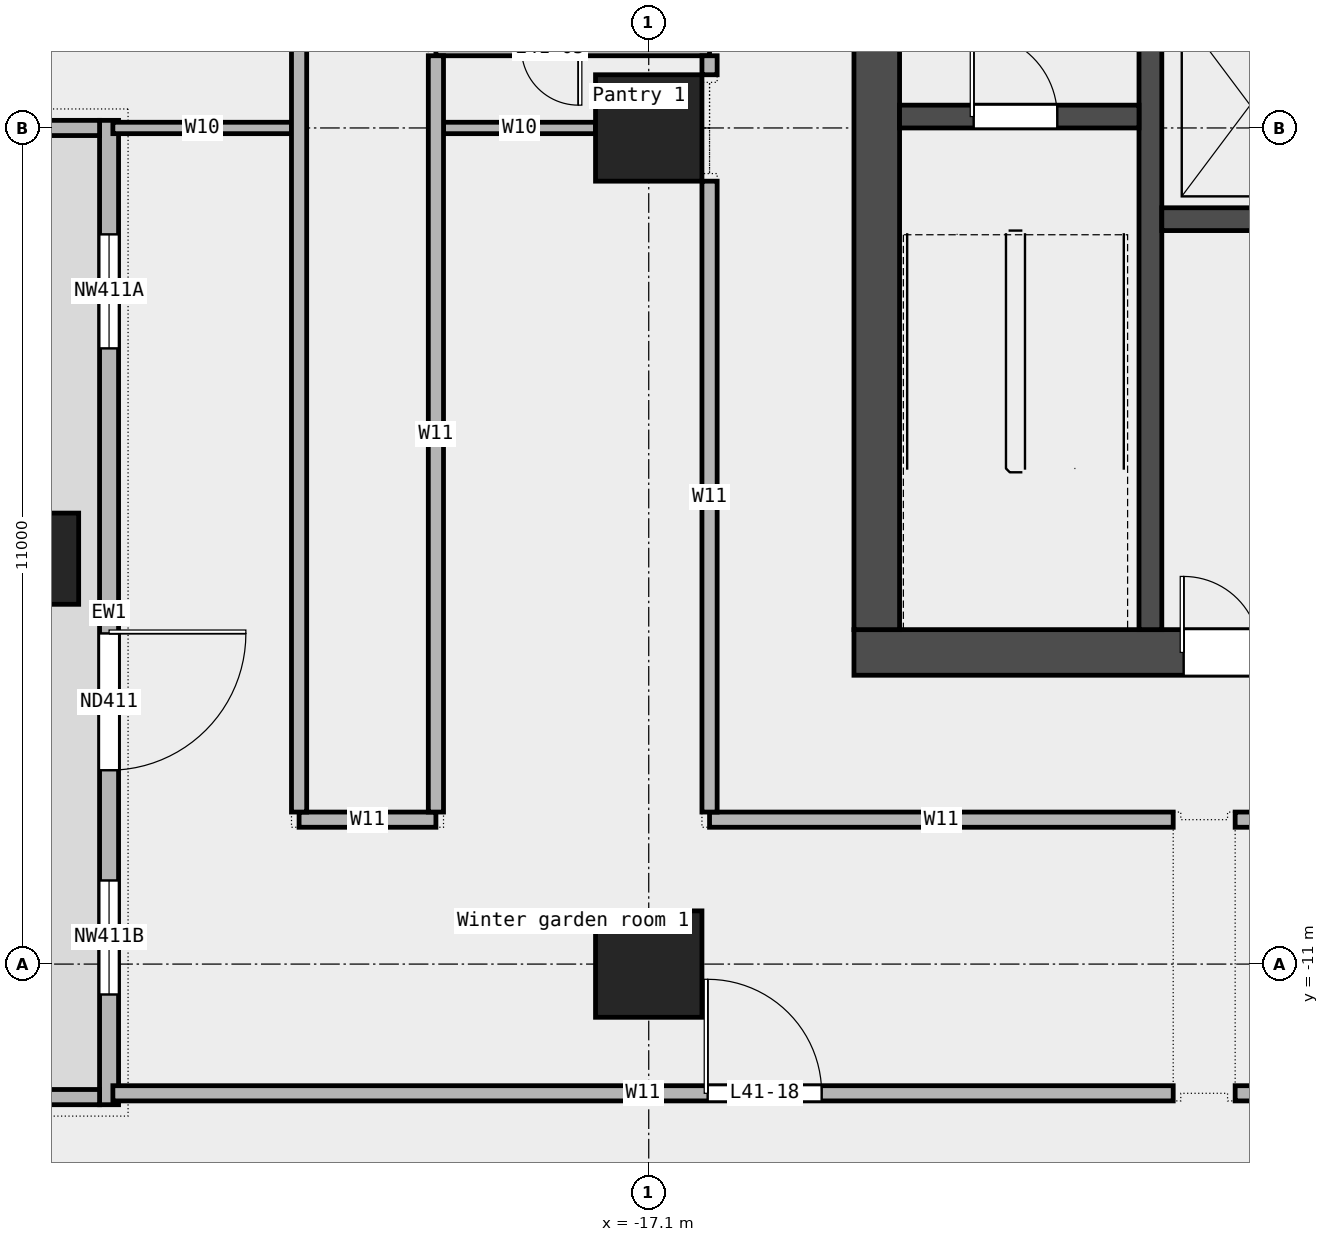
"""IFC4 building model, lengths in metres.
Left out: names, types, materials, properties, quantities, classifications, styles, units other than length and angle.
Written with IfcOpenShell. Run it as: python <this file> out.ifc"""

import sys

from ifc_helpers import new_model, si_unit, direction, frame, frame_2d, origin, origin_2d, place, context, subcontext, project, spatial, rectangle, extrude, element, fill, save


model = new_model("IFC4")
c1 = context("Model", 3, precision=1e-05, world=origin(), true_north=direction((0.0, 1.0)))
c2 = subcontext(c1, "Body", "Model", "MODEL_VIEW")
j1 = project(units=[si_unit("LENGTHUNIT", "METRE"), si_unit("PLANEANGLEUNIT", "RADIAN")], contexts=[c1])
p1 = place(None, origin())
s1 = spatial("IfcSite", under=j1, at=p1, CompositionType="ELEMENT")
p2 = place(p1, origin())
s2 = spatial("IfcBuilding", under=s1, at=p2, CompositionType="ELEMENT")
p3 = place(p2, frame((0.0, 0.0, 197.0)))
s3 = spatial("IfcBuildingStorey", under=s2, at=p3, CompositionType="ELEMENT", Elevation=197.0)
p4 = place(p3, frame((-25.2, -5.667, 0.0), z_axis=(0.0, 0.0, 1.0), x_axis=(1.0, 0.0, 0.0)))
e1 = element("IfcColumn", 1, at=p4, inside=s3, PredefinedType="COLUMN", context=c2, shape_type="SweptSolid", body=[
    extrude(rectangle(XDim=1.2, YDim=1.2, at=origin_2d()), origin(), (0.0, 0.0, 1.0), 3.6),
])
for number, where, z_axis, x_axis in (
    (2, (-17.1, -11.0, 0.0), (0.0, 0.0, 1.0), (1.0, 0.0, 0.0)),
    (3, (-17.1, 0.0, 0.0), (0.0, 0.0, 1.0), (1.0, 0.0, 0.0)),
):
    element("IfcColumn", number, at=place(p3, frame(where, z_axis=z_axis, x_axis=x_axis)), inside=s3, PredefinedType="COLUMN", context=c2, shape_type="SweptSolid", body=[
        extrude(rectangle(XDim=1.4, YDim=1.4, at=origin_2d()), origin(), (0.0, 0.0, 1.0), 3.6),
    ])
p5 = place(p3, frame((-24.2, 0.1, 0.0), z_axis=(0.0, 0.0, 1.0), x_axis=(0.0, -1.0, 0.0)))
e4 = element("IfcWall", 4, at=p5, inside=s3, PredefinedType="STANDARD", context=c2, shape_type="SweptSolid", body=[
    extrude(rectangle(XDim=12.95, YDim=0.25, at=frame_2d((6.475, 0.0))), origin(), (0.0, 0.0, 1.0), 3.6),
])
p6 = place(p5, frame((1.5, 0.0, 0.45)))
e5 = element("IfcOpeningElement", 5, at=p6, cuts=e4, PredefinedType="OPENING", context=c2, shape_type="SweptSolid", body=[
    extrude(rectangle(XDim=1.5, YDim=2.4, at=frame_2d((0.75, 1.2))), frame((0.0, 0.137, 0.0), z_axis=(0.0, -1.0, 0.0), x_axis=(1.0, 0.0, 0.0)), (0.0, 0.0, 1.0), 0.274),
])
p7 = place(p5, frame((6.75, 0.0, 0.0)))
e6 = element("IfcOpeningElement", 6, at=p7, cuts=e4, PredefinedType="OPENING", context=c2, shape_type="SweptSolid", body=[
    extrude(rectangle(XDim=1.8, YDim=2.4, at=frame_2d((0.9, 1.2))), frame((0.0, 0.137, 0.0), z_axis=(0.0, -1.0, 0.0), x_axis=(1.0, 0.0, 0.0)), (0.0, 0.0, 1.0), 0.274),
])
p8 = place(p5, frame((10.0, 0.0, 0.45)))
e7 = element("IfcOpeningElement", 7, at=p8, cuts=e4, PredefinedType="OPENING", context=c2, shape_type="SweptSolid", body=[
    extrude(rectangle(XDim=1.5, YDim=2.4, at=frame_2d((0.75, 1.2))), frame((0.0, 0.137, 0.0), z_axis=(0.0, -1.0, 0.0), x_axis=(1.0, 0.0, 0.0)), (0.0, 0.0, 1.0), 0.274),
])
for number, where, z_axis, x_axis in (
    (8, (-26.2, 0.0, 0.0), (0.0, 0.0, 1.0), (1.0, 0.0, 0.0)),
    (9, (-26.2, -12.75, 0.0), (0.0, 0.0, 1.0), (1.0, 0.0, 0.0)),
):
    element("IfcWall", number, at=place(p3, frame(where, z_axis=z_axis, x_axis=x_axis)), inside=s3, PredefinedType="STANDARD", context=c2, shape_type="SweptSolid", body=[
        extrude(rectangle(XDim=1.875, YDim=0.2, at=frame_2d((0.938, 0.0))), origin(), (0.0, 0.0, 1.0), 3.6),
    ])
p9 = place(p3, frame((-24.15, -12.7, 0.0), z_axis=(0.0, 0.0, 1.0), x_axis=(1.0, 0.0, 0.0)))
e10 = element("IfcWall", 10, at=p9, inside=s3, PredefinedType="PARTITIONING", context=c2, shape_type="SweptSolid", body=[
    extrude(rectangle(XDim=13.95, YDim=0.2, at=frame_2d((6.975, 0.0))), origin(), (0.0, 0.0, 1.0), 3.6),
])
p10 = place(p9, frame((7.825, 0.0, 0.0)))
e11 = element("IfcOpeningElement", 11, at=p10, cuts=e10, PredefinedType="OPENING", context=c2, shape_type="SweptSolid", body=[
    extrude(rectangle(XDim=1.5, YDim=2.1, at=frame_2d((0.75, 1.05))), frame((0.0, 0.112, 0.0), z_axis=(0.0, -1.0, 0.0), x_axis=(1.0, 0.0, 0.0)), (0.0, 0.0, 1.0), 0.224),
])
p11 = place(p3, frame((-9.385, -12.7, 0.0), z_axis=(0.0, 0.0, 1.0), x_axis=(1.0, 0.0, 0.0)))
e12 = element("IfcWall", 12, at=p11, inside=s3, PredefinedType="PARTITIONING", context=c2, shape_type="SweptSolid", body=[
    extrude(rectangle(XDim=12.425, YDim=0.2, at=frame_2d((6.212, 0.0))), origin(), (0.0, 0.0, 1.0), 3.6),
])
p12 = place(p3, frame((-21.7, -9.1, 0.0), z_axis=(0.0, 0.0, 1.0), x_axis=(1.0, 0.0, 0.0)))
e13 = element("IfcWall", 13, at=p12, inside=s3, PredefinedType="PARTITIONING", context=c2, shape_type="SweptSolid", body=[
    extrude(rectangle(XDim=1.8, YDim=0.2, at=frame_2d((0.9, 0.0))), origin(), (0.0, 0.0, 1.0), 3.6),
])
p13 = place(p3, frame((-16.3, -9.1, 0.0), z_axis=(0.0, 0.0, 1.0), x_axis=(1.0, 0.0, 0.0)))
e14 = element("IfcWall", 14, at=p13, inside=s3, PredefinedType="PARTITIONING", context=c2, shape_type="SweptSolid", body=[
    extrude(rectangle(XDim=6.1, YDim=0.2, at=frame_2d((3.05, 0.0))), origin(), (0.0, 0.0, 1.0), 3.6),
])
p14 = place(p3, frame((-9.385, -9.1, 0.0), z_axis=(0.0, 0.0, 1.0), x_axis=(1.0, 0.0, 0.0)))
e15 = element("IfcWall", 15, at=p14, inside=s3, PredefinedType="PARTITIONING", context=c2, shape_type="SweptSolid", body=[
    extrude(rectangle(XDim=12.425, YDim=0.2, at=frame_2d((6.212, 0.0))), origin(), (0.0, 0.0, 1.0), 3.6),
])
p15 = place(p14, frame((5.762, 0.0, 0.0)))
e16 = element("IfcOpeningElement", 16, at=p15, cuts=e15, PredefinedType="OPENING", context=c2, shape_type="SweptSolid", body=[
    extrude(rectangle(XDim=0.9, YDim=2.1, at=frame_2d((0.45, 1.05))), frame((0.0, 0.112, 0.0), z_axis=(0.0, -1.0, 0.0), x_axis=(1.0, 0.0, 0.0)), (0.0, 0.0, 1.0), 0.224),
])
p16 = place(p3, frame((-24.15, 0.0, 0.0), z_axis=(0.0, 0.0, 1.0), x_axis=(1.0, 0.0, 0.0)))
e17 = element("IfcWall", 17, at=p16, inside=s3, PredefinedType="PARTITIONING", context=c2, shape_type="SweptSolid", body=[
    extrude(rectangle(XDim=2.35, YDim=0.15, at=frame_2d((1.175, 0.0))), origin(), (0.0, 0.0, 1.0), 3.6),
])
p17 = place(p3, frame((-19.8, 0.0, 0.0), z_axis=(0.0, 0.0, 1.0), x_axis=(1.0, 0.0, 0.0)))
e18 = element("IfcWall", 18, at=p17, inside=s3, PredefinedType="PARTITIONING", context=c2, shape_type="SweptSolid", body=[
    extrude(rectangle(XDim=2.0, YDim=0.15, at=frame_2d((1.0, 0.0))), origin(), (0.0, 0.0, 1.0), 3.6),
])
p18 = place(p3, frame((-19.9, 1.05, 0.0), z_axis=(0.0, 0.0, 1.0), x_axis=(1.0, 0.0, 0.0)))
e19 = element("IfcWall", 19, at=p18, inside=s3, PredefinedType="PARTITIONING", context=c2, shape_type="SweptSolid", body=[
    extrude(rectangle(XDim=3.6, YDim=0.2, at=frame_2d((1.8, 0.0))), origin(), (0.0, 0.0, 1.0), 3.6),
])
p19 = place(p18, frame((1.125, 0.0, 0.0)))
e20 = element("IfcOpeningElement", 20, at=p19, cuts=e19, PredefinedType="OPENING", context=c2, shape_type="SweptSolid", body=[
    extrude(rectangle(XDim=0.75, YDim=2.1, at=frame_2d((0.375, 1.05))), frame((0.0, 0.112, 0.0), z_axis=(0.0, -1.0, 0.0), x_axis=(1.0, 0.0, 0.0)), (0.0, 0.0, 1.0), 0.224),
])
p20 = place(p3, frame((-21.7, -9.0, 0.0), z_axis=(0.0, 0.0, 1.0), x_axis=(0.0, 1.0, 0.0)))
e21 = element("IfcWall", 21, at=p20, inside=s3, PredefinedType="PARTITIONING", context=c2, shape_type="SweptSolid", body=[
    extrude(rectangle(XDim=24.3, YDim=0.2, at=frame_2d((12.15, 0.0))), origin(), (0.0, 0.0, 1.0), 3.6),
])
p21 = place(p20, frame((18.305, 0.0, 0.0)))
e22 = element("IfcOpeningElement", 22, at=p21, cuts=e21, PredefinedType="OPENING", context=c2, shape_type="SweptSolid", body=[
    extrude(rectangle(XDim=1.2, YDim=2.1, at=frame_2d((0.6, 1.05))), frame((0.0, 0.112, 0.0), z_axis=(0.0, -1.0, 0.0), x_axis=(1.0, 0.0, 0.0)), (0.0, 0.0, 1.0), 0.224),
])
p22 = place(p20, frame((10.805, 0.0, 0.0)))
e23 = element("IfcOpeningElement", 23, at=p22, cuts=e21, PredefinedType="OPENING", context=c2, shape_type="SweptSolid", body=[
    extrude(rectangle(XDim=0.9, YDim=2.1, at=frame_2d((0.45, 1.05))), frame((0.0, 0.112, 0.0), z_axis=(0.0, -1.0, 0.0), x_axis=(1.0, 0.0, 0.0)), (0.0, 0.0, 1.0), 0.224),
])
p23 = place(p3, frame((-19.9, -9.0, 0.0), z_axis=(0.0, 0.0, 1.0), x_axis=(0.0, 1.0, 0.0)))
e24 = element("IfcWall", 24, at=p23, inside=s3, PredefinedType="PARTITIONING", context=c2, shape_type="SweptSolid", body=[
    extrude(rectangle(XDim=9.95, YDim=0.2, at=frame_2d((4.975, 0.0))), origin(), (0.0, 0.0, 1.0), 3.6),
])
p24 = place(p3, frame((-16.3, -9.0, 0.0), z_axis=(0.0, 0.0, 1.0), x_axis=(0.0, 1.0, 0.0)))
e25 = element("IfcWall", 25, at=p24, inside=s3, PredefinedType="PARTITIONING", context=c2, shape_type="SweptSolid", body=[
    extrude(rectangle(XDim=8.3, YDim=0.2, at=frame_2d((4.15, 0.0))), origin(), (0.0, 0.0, 1.0), 3.6),
])
p25 = place(p3, frame((-16.3, 0.7, 0.0), z_axis=(0.0, 0.0, 1.0), x_axis=(0.0, 1.0, 0.0)))
e26 = element("IfcWall", 26, at=p25, inside=s3, PredefinedType="PARTITIONING", context=c2, shape_type="SweptSolid", body=[
    extrude(rectangle(XDim=0.25, YDim=0.2, at=frame_2d((0.125, 0.0))), origin(), (0.0, 0.0, 1.0), 3.6),
])
p26 = place(p3, frame((-14.4, -6.9, 0.0), z_axis=(0.0, 0.0, 1.0), x_axis=(1.0, 0.0, 0.0)))
e27 = element("IfcWall", 27, at=p26, inside=s3, PredefinedType="SHEAR", context=c2, shape_type="SweptSolid", body=[
    extrude(rectangle(XDim=28.8, YDim=0.6, at=frame_2d((14.4, 0.0))), origin(), (0.0, 0.0, 1.0), 3.7),
])
p27 = place(p26, frame((4.337, 0.0, 0.0)))
e28 = element("IfcOpeningElement", 28, at=p27, cuts=e27, PredefinedType="OPENING", context=c2, shape_type="SweptSolid", body=[
    extrude(rectangle(XDim=1.0, YDim=2.1, at=frame_2d((0.5, 1.05))), frame((0.0, 0.312, 0.0), z_axis=(0.0, -1.0, 0.0), x_axis=(1.0, 0.0, 0.0)), (0.0, 0.0, 1.0), 0.624),
])
p28 = place(p26, frame((6.212, 0.0, 0.0)))
e29 = element("IfcOpeningElement", 29, at=p28, cuts=e27, PredefinedType="OPENING", context=c2, shape_type="SweptSolid", body=[
    extrude(rectangle(XDim=1.0, YDim=2.1, at=frame_2d((0.5, 1.05))), frame((0.0, 0.312, 0.0), z_axis=(0.0, -1.0, 0.0), x_axis=(1.0, 0.0, 0.0)), (0.0, 0.0, 1.0), 0.624),
])
p29 = place(p26, frame((8.462, 0.0, 0.0)))
e30 = element("IfcOpeningElement", 30, at=p29, cuts=e27, PredefinedType="OPENING", context=c2, shape_type="SweptSolid", body=[
    extrude(rectangle(XDim=1.0, YDim=2.1, at=frame_2d((0.5, 1.05))), frame((0.0, 0.312, 0.0), z_axis=(0.0, -1.0, 0.0), x_axis=(1.0, 0.0, 0.0)), (0.0, 0.0, 1.0), 0.624),
])
p30 = place(p26, frame((13.05, 0.0, 0.0)))
e31 = element("IfcOpeningElement", 31, at=p30, cuts=e27, PredefinedType="OPENING", context=c2, shape_type="SweptSolid", body=[
    extrude(rectangle(XDim=1.2, YDim=2.1, at=frame_2d((0.6, 1.05))), frame((0.0, 0.312, 0.0), z_axis=(0.0, -1.0, 0.0), x_axis=(1.0, 0.0, 0.0)), (0.0, 0.0, 1.0), 0.624),
])
p31 = place(p26, frame((18.75, 0.0, 0.0)))
e32 = element("IfcOpeningElement", 32, at=p31, cuts=e27, PredefinedType="OPENING", context=c2, shape_type="SweptSolid", body=[
    extrude(rectangle(XDim=1.8, YDim=2.1, at=frame_2d((0.9, 1.05))), frame((0.0, 0.312, 0.0), z_axis=(0.0, -1.0, 0.0), x_axis=(1.0, 0.0, 0.0)), (0.0, 0.0, 1.0), 0.624),
])
p32 = place(p26, frame((23.087, 0.0, 0.0)))
e33 = element("IfcOpeningElement", 33, at=p32, cuts=e27, PredefinedType="OPENING", context=c2, shape_type="SweptSolid", body=[
    extrude(rectangle(XDim=1.0, YDim=2.1, at=frame_2d((0.5, 1.05))), frame((0.0, 0.312, 0.0), z_axis=(0.0, -1.0, 0.0), x_axis=(1.0, 0.0, 0.0)), (0.0, 0.0, 1.0), 0.624),
])
p33 = place(p3, frame((-14.1, -6.6, 0.0), z_axis=(0.0, 0.0, 1.0), x_axis=(0.0, 1.0, 0.0)))
e34 = element("IfcWall", 34, at=p33, inside=s3, PredefinedType="SHEAR", context=c2, shape_type="SweptSolid", body=[
    extrude(rectangle(XDim=19.5, YDim=0.6, at=frame_2d((9.75, 0.0))), origin(), (0.0, 0.0, 1.0), 3.7),
])
p34 = place(p33, frame((9.3, 0.0, 0.0)))
e35 = element("IfcOpeningElement", 35, at=p34, cuts=e34, PredefinedType="OPENING", context=c2, shape_type="SweptSolid", body=[
    extrude(rectangle(XDim=1.8, YDim=2.1, at=frame_2d((0.9, 1.05))), frame((0.0, 0.312, 0.0), z_axis=(0.0, -1.0, 0.0), x_axis=(1.0, 0.0, 0.0)), (0.0, 0.0, 1.0), 0.624),
])
p35 = place(p3, frame((-10.5, -6.6, 0.0), z_axis=(0.0, 0.0, 1.0), x_axis=(0.0, 1.0, 0.0)))
e36 = element("IfcWall", 36, at=p35, inside=s3, PredefinedType="SHEAR", context=c2, shape_type="SweptSolid", body=[
    extrude(rectangle(XDim=8.55, YDim=0.3, at=frame_2d((4.275, 0.0))), origin(), (0.0, 0.0, 1.0), 3.7),
])
p36 = place(p3, frame((-13.8, 0.15, 0.0), z_axis=(0.0, 0.0, 1.0), x_axis=(1.0, 0.0, 0.0)))
e37 = element("IfcWall", 37, at=p36, inside=s3, PredefinedType="SOLIDWALL", context=c2, shape_type="SweptSolid", body=[
    extrude(rectangle(XDim=3.15, YDim=0.3, at=frame_2d((1.575, 0.0))), origin(), (0.0, 0.0, 1.0), 3.7),
])
p37 = place(p36, frame((0.975, 0.0, 0.0)))
e38 = element("IfcOpeningElement", 38, at=p37, cuts=e37, PredefinedType="OPENING", context=c2, shape_type="SweptSolid", body=[
    extrude(rectangle(XDim=1.1, YDim=2.1, at=frame_2d((0.55, 1.05))), frame((0.0, 0.162, 0.0), z_axis=(0.0, -1.0, 0.0), x_axis=(1.0, 0.0, 0.0)), (0.0, 0.0, 1.0), 0.324),
])
p38 = place(p3, frame((-10.35, -1.2, 0.0), z_axis=(0.0, 0.0, 1.0), x_axis=(1.0, 0.0, 0.0)))
e39 = element("IfcWall", 39, at=p38, inside=s3, PredefinedType="SOLIDWALL", context=c2, shape_type="SweptSolid", body=[
    extrude(rectangle(XDim=20.7, YDim=0.3, at=frame_2d((10.35, 0.0))), origin(), (0.0, 0.0, 1.0), 3.7),
])
p39 = place(p6, origin())
e40 = element("IfcWindow", 40, at=p39, inside=s3, PartitioningType="SINGLE_PANEL", PredefinedType="WINDOW", context=c2, shape_type="SweptSolid", body=[
    extrude(rectangle(XDim=1.5, YDim=2.4, at=frame_2d((0.75, 1.2))), frame((0.0, 0.03, 0.0), z_axis=(0.0, -1.0, 0.0), x_axis=(1.0, 0.0, 0.0)), (0.0, 0.0, 1.0), 0.06),
])
fill(e5, e40)
p40 = place(p7, origin())
e41 = element("IfcDoor", 41, at=p40, inside=s3, OperationType="DOUBLE_DOOR_SINGLE_SWING", PredefinedType="DOOR", context=c2, shape_type="SweptSolid", body=[
    extrude(rectangle(XDim=1.8, YDim=2.4, at=frame_2d((0.9, 1.2))), frame((0.0, 0.025, 0.0), z_axis=(0.0, -1.0, 0.0), x_axis=(1.0, 0.0, 0.0)), (0.0, 0.0, 1.0), 0.05),
])
fill(e6, e41)
p41 = place(p8, origin())
e42 = element("IfcWindow", 42, at=p41, inside=s3, PartitioningType="SINGLE_PANEL", PredefinedType="WINDOW", context=c2, shape_type="SweptSolid", body=[
    extrude(rectangle(XDim=1.5, YDim=2.4, at=frame_2d((0.75, 1.2))), frame((0.0, 0.03, 0.0), z_axis=(0.0, -1.0, 0.0), x_axis=(1.0, 0.0, 0.0)), (0.0, 0.0, 1.0), 0.06),
])
fill(e7, e42)
p42 = place(p10, origin())
e43 = element("IfcDoor", 43, at=p42, inside=s3, OperationType="DOUBLE_DOOR_SINGLE_SWING", PredefinedType="DOOR", context=c2, shape_type="SweptSolid", body=[
    extrude(rectangle(XDim=1.5, YDim=2.1, at=frame_2d((0.75, 1.05))), frame((0.0, 0.025, 0.0), z_axis=(0.0, -1.0, 0.0), x_axis=(1.0, 0.0, 0.0)), (0.0, 0.0, 1.0), 0.05),
])
fill(e11, e43)
p43 = place(p37, origin())
e44 = element("IfcDoor", 44, at=p43, inside=s3, OperationType="SINGLE_SWING_LEFT", PredefinedType="DOOR", context=c2, shape_type="SweptSolid", body=[
    extrude(rectangle(XDim=1.1, YDim=2.1, at=frame_2d((0.55, 1.05))), frame((0.0, 0.025, 0.0), z_axis=(0.0, -1.0, 0.0), x_axis=(1.0, 0.0, 0.0)), (0.0, 0.0, 1.0), 0.05),
])
fill(e38, e44)
p44 = place(p27, origin())
e45 = element("IfcDoor", 45, at=p44, inside=s3, OperationType="SINGLE_SWING_LEFT", PredefinedType="DOOR", context=c2, shape_type="SweptSolid", body=[
    extrude(rectangle(XDim=1.0, YDim=2.1, at=frame_2d((0.5, 1.05))), frame((0.0, 0.025, 0.0), z_axis=(0.0, -1.0, 0.0), x_axis=(1.0, 0.0, 0.0)), (0.0, 0.0, 1.0), 0.05),
])
fill(e28, e45)
save(model, sys.argv[1])
